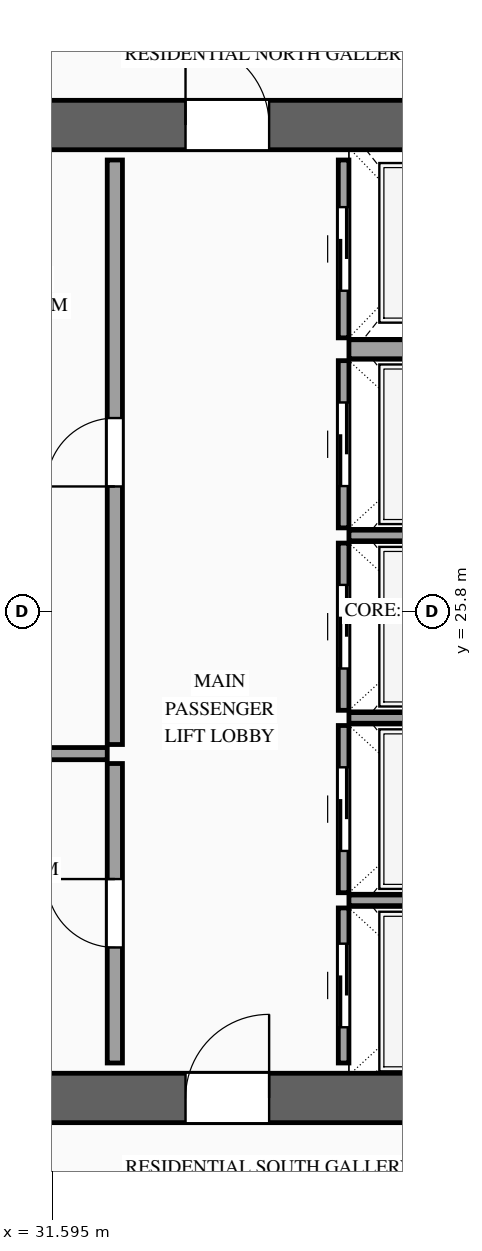
"""IFC4 building model, lengths in metres.
Left out: names, types, materials, properties, quantities, classifications, styles, units other than length and angle.
Written with IfcOpenShell. Run it as: python <this file> out.ifc"""

import sys

from ifc_helpers import new_model, si_unit, direction, frame, frame_2d, origin, place, context, subcontext, project, spatial, rectangle, extrude, source, transform, mapped, element, fill, save


model = new_model("IFC4")
c1 = context("Model", 3, precision=1e-05, world=origin(), true_north=direction((0.0, 1.0)))
c2 = subcontext(c1, "Body", "Model", "MODEL_VIEW")
j1 = project(units=[si_unit("LENGTHUNIT", "METRE"), si_unit("PLANEANGLEUNIT", "RADIAN")], contexts=[c1])
p1 = place(None, origin())
s1 = spatial("IfcSite", under=j1, at=p1, CompositionType="ELEMENT")
p2 = place(p1, origin())
s2 = spatial("IfcBuilding", under=s1, at=p2, CompositionType="ELEMENT")
p3 = place(p2, frame((0.0, 0.0, 216.0)))
s3 = spatial("IfcBuildingStorey", under=s2, at=p3, CompositionType="ELEMENT", Elevation=216.0)
p4 = place(p3, frame((23.475, 19.4, 0.0), z_axis=(0.0, 0.0, 1.0), x_axis=(1.0, 0.0, 0.0)))
e1 = element("IfcWall", 1, at=p4, inside=s3, PredefinedType="SHEAR", context=c2, shape_type="SweptSolid", body=[
    extrude(rectangle(XDim=27.05, YDim=0.65, at=frame_2d((13.525, 0.0))), origin(), (0.0, 0.0, 1.0), 3.5),
])
p5 = place(p4, frame((1.975, 0.0, 0.0)))
e2 = element("IfcOpeningElement", 2, at=p5, cuts=e1, PredefinedType="OPENING", context=c2, shape_type="SweptSolid", body=[
    extrude(rectangle(XDim=1.1, YDim=2.2, at=frame_2d((0.55, 1.1))), frame((0.0, 0.34, 0.0), z_axis=(0.0, -1.0, 0.0), x_axis=(1.0, 0.0, 0.0)), (0.0, 0.0, 1.0), 0.68),
])
p6 = place(p4, frame((9.875, 0.0, 0.0)))
e3 = element("IfcOpeningElement", 3, at=p6, cuts=e1, PredefinedType="OPENING", context=c2, shape_type="SweptSolid", body=[
    extrude(rectangle(XDim=1.1, YDim=2.2, at=frame_2d((0.55, 1.1))), frame((0.0, 0.34, 0.0), z_axis=(0.0, -1.0, 0.0), x_axis=(1.0, 0.0, 0.0)), (0.0, 0.0, 1.0), 0.68),
])
p7 = place(p4, frame((23.075, 0.0, 0.0)))
e4 = element("IfcOpeningElement", 4, at=p7, cuts=e1, PredefinedType="OPENING", context=c2, shape_type="SweptSolid", body=[
    extrude(rectangle(XDim=1.1, YDim=2.2, at=frame_2d((0.55, 1.1))), frame((0.0, 0.34, 0.0), z_axis=(0.0, -1.0, 0.0), x_axis=(1.0, 0.0, 0.0)), (0.0, 0.0, 1.0), 0.68),
])
p8 = place(p4, frame((19.695, 0.0, 0.0)))
e5 = element("IfcOpeningElement", 5, at=p8, cuts=e1, PredefinedType="OPENING", context=c2, shape_type="SweptSolid", body=[
    extrude(rectangle(XDim=0.9, YDim=2.15, at=frame_2d((0.45, 1.075))), frame((0.0, 0.34, 0.0), z_axis=(0.0, -1.0, 0.0), x_axis=(1.0, 0.0, 0.0)), (0.0, 0.0, 1.0), 0.68),
])
p9 = place(p4, frame((18.255, 0.0, 0.0)))
e6 = element("IfcOpeningElement", 6, at=p9, cuts=e1, PredefinedType="OPENING", context=c2, shape_type="SweptSolid", body=[
    extrude(rectangle(XDim=0.9, YDim=2.15, at=frame_2d((0.45, 1.075))), frame((0.0, 0.34, 0.0), z_axis=(0.0, -1.0, 0.0), x_axis=(1.0, 0.0, 0.0)), (0.0, 0.0, 1.0), 0.68),
])
p10 = place(p3, frame((23.475, 32.2, 0.0), z_axis=(0.0, 0.0, 1.0), x_axis=(1.0, 0.0, 0.0)))
e7 = element("IfcWall", 7, at=p10, inside=s3, PredefinedType="SHEAR", context=c2, shape_type="SweptSolid", body=[
    extrude(rectangle(XDim=27.05, YDim=0.65, at=frame_2d((13.525, 0.0))), origin(), (0.0, 0.0, 1.0), 3.5),
])
p11 = place(p10, frame((4.595, 0.0, 0.0)))
e8 = element("IfcOpeningElement", 8, at=p11, cuts=e7, PredefinedType="OPENING", context=c2, shape_type="SweptSolid", body=[
    extrude(rectangle(XDim=0.9, YDim=2.15, at=frame_2d((0.45, 1.075))), frame((0.0, 0.34, 0.0), z_axis=(0.0, -1.0, 0.0), x_axis=(1.0, 0.0, 0.0)), (0.0, 0.0, 1.0), 0.68),
])
p12 = place(p10, frame((9.875, 0.0, 0.0)))
e9 = element("IfcOpeningElement", 9, at=p12, cuts=e7, PredefinedType="OPENING", context=c2, shape_type="SweptSolid", body=[
    extrude(rectangle(XDim=1.1, YDim=2.2, at=frame_2d((0.55, 1.1))), frame((0.0, 0.34, 0.0), z_axis=(0.0, -1.0, 0.0), x_axis=(1.0, 0.0, 0.0)), (0.0, 0.0, 1.0), 0.68),
])
p13 = place(p10, frame((15.725, 0.0, 0.0)))
e10 = element("IfcOpeningElement", 10, at=p13, cuts=e7, PredefinedType="OPENING", context=c2, shape_type="SweptSolid", body=[
    extrude(rectangle(XDim=1.1, YDim=2.2, at=frame_2d((0.55, 1.1))), frame((0.0, 0.34, 0.0), z_axis=(0.0, -1.0, 0.0), x_axis=(1.0, 0.0, 0.0)), (0.0, 0.0, 1.0), 0.68),
])
p14 = place(p10, frame((18.925, 0.0, 0.0)))
e11 = element("IfcOpeningElement", 11, at=p14, cuts=e7, PredefinedType="OPENING", context=c2, shape_type="SweptSolid", body=[
    extrude(rectangle(XDim=0.9, YDim=2.15, at=frame_2d((0.45, 1.075))), frame((0.0, 0.34, 0.0), z_axis=(0.0, -1.0, 0.0), x_axis=(1.0, 0.0, 0.0)), (0.0, 0.0, 1.0), 0.68),
])
p15 = place(p3, frame((35.43, 19.86, 0.0), z_axis=(0.0, 0.0, 1.0), x_axis=(0.0, 1.0, 0.0)))
e12 = element("IfcWall", 12, at=p15, inside=s3, PredefinedType="SOLIDWALL", context=c2, shape_type="SweptSolid", body=[
    extrude(rectangle(XDim=2.04, YDim=0.14, at=frame_2d((1.02, 0.0))), origin(), (0.0, 0.0, 1.0), 3.22),
])
p16 = place(p15, frame((0.47, 0.0, 0.0)))
e13 = element("IfcOpeningElement", 13, at=p16, cuts=e12, PredefinedType="OPENING", context=c2, shape_type="SweptSolid", body=[
    extrude(rectangle(XDim=1.1, YDim=2.2, at=frame_2d((0.55, 1.1))), frame((0.0, 0.085, 0.0), z_axis=(0.0, -1.0, 0.0), x_axis=(1.0, 0.0, 0.0)), (0.0, 0.0, 1.0), 0.17),
])
m1 = source(origin(), c2, "Body", "SweptSolid", [
    extrude(rectangle(XDim=2.4, YDim=0.14, at=frame_2d((1.2, 0.0))), origin(), (0.0, 0.0, 1.0), 3.22),
])
p17 = place(p3, frame((35.5, 22.0, 0.0), z_axis=(0.0, 0.0, 1.0), x_axis=(1.0, 0.0, 0.0)))
e14 = element("IfcWall", 14, at=p17, inside=s3, PredefinedType="SOLIDWALL", context=c2, shape_type="MappedRepresentation", body=[
    mapped(m1, transform((0.0, 0.0, 0.0), scale=1.0)),
])
p18 = place(p3, frame((35.43, 22.1, 0.0), z_axis=(0.0, 0.0, 1.0), x_axis=(0.0, 1.0, 0.0)))
e15 = element("IfcWall", 15, at=p18, inside=s3, PredefinedType="SOLIDWALL", context=c2, shape_type="SweptSolid", body=[
    extrude(rectangle(XDim=2.2, YDim=0.14, at=frame_2d((1.1, 0.0))), origin(), (0.0, 0.0, 1.0), 3.22),
])
p19 = place(p18, frame((0.55, 0.0, 0.0)))
e16 = element("IfcOpeningElement", 16, at=p19, cuts=e15, PredefinedType="OPENING", context=c2, shape_type="SweptSolid", body=[
    extrude(rectangle(XDim=1.1, YDim=2.2, at=frame_2d((0.55, 1.1))), frame((0.0, 0.085, 0.0), z_axis=(0.0, -1.0, 0.0), x_axis=(1.0, 0.0, 0.0)), (0.0, 0.0, 1.0), 0.17),
])
p20 = place(p3, frame((35.5, 24.4, 0.0), z_axis=(0.0, 0.0, 1.0), x_axis=(1.0, 0.0, 0.0)))
e17 = element("IfcWall", 17, at=p20, inside=s3, PredefinedType="SOLIDWALL", context=c2, shape_type="MappedRepresentation", body=[
    mapped(m1, transform((0.0, 0.0, 0.0), scale=1.0)),
])
p21 = place(p3, frame((35.43, 24.5, 0.0), z_axis=(0.0, 0.0, 1.0), x_axis=(0.0, 1.0, 0.0)))
e18 = element("IfcWall", 18, at=p21, inside=s3, PredefinedType="SOLIDWALL", context=c2, shape_type="SweptSolid", body=[
    extrude(rectangle(XDim=2.2, YDim=0.14, at=frame_2d((1.1, 0.0))), origin(), (0.0, 0.0, 1.0), 3.22),
])
p22 = place(p21, frame((0.55, 0.0, 0.0)))
e19 = element("IfcOpeningElement", 19, at=p22, cuts=e18, PredefinedType="OPENING", context=c2, shape_type="SweptSolid", body=[
    extrude(rectangle(XDim=1.1, YDim=2.2, at=frame_2d((0.55, 1.1))), frame((0.0, 0.085, 0.0), z_axis=(0.0, -1.0, 0.0), x_axis=(1.0, 0.0, 0.0)), (0.0, 0.0, 1.0), 0.17),
])
p23 = place(p3, frame((35.5, 26.8, 0.0), z_axis=(0.0, 0.0, 1.0), x_axis=(1.0, 0.0, 0.0)))
e20 = element("IfcWall", 20, at=p23, inside=s3, PredefinedType="SOLIDWALL", context=c2, shape_type="MappedRepresentation", body=[
    mapped(m1, transform((0.0, 0.0, 0.0), scale=1.0)),
])
p24 = place(p3, frame((35.43, 26.9, 0.0), z_axis=(0.0, 0.0, 1.0), x_axis=(0.0, 1.0, 0.0)))
e21 = element("IfcWall", 21, at=p24, inside=s3, PredefinedType="SOLIDWALL", context=c2, shape_type="SweptSolid", body=[
    extrude(rectangle(XDim=2.2, YDim=0.14, at=frame_2d((1.1, 0.0))), origin(), (0.0, 0.0, 1.0), 3.22),
])
p25 = place(p24, frame((0.55, 0.0, 0.0)))
e22 = element("IfcOpeningElement", 22, at=p25, cuts=e21, PredefinedType="OPENING", context=c2, shape_type="SweptSolid", body=[
    extrude(rectangle(XDim=1.1, YDim=2.2, at=frame_2d((0.55, 1.1))), frame((0.0, 0.085, 0.0), z_axis=(0.0, -1.0, 0.0), x_axis=(1.0, 0.0, 0.0)), (0.0, 0.0, 1.0), 0.17),
])
p26 = place(p3, frame((35.43, 29.4, 0.0), z_axis=(0.0, 0.0, 1.0), x_axis=(0.0, 1.0, 0.0)))
e23 = element("IfcWall", 23, at=p26, inside=s3, PredefinedType="SOLIDWALL", context=c2, shape_type="SweptSolid", body=[
    extrude(rectangle(XDim=2.34, YDim=0.14, at=frame_2d((1.17, 0.0))), origin(), (0.0, 0.0, 1.0), 3.22),
])
p27 = place(p26, frame((0.62, 0.0, 0.0)))
e24 = element("IfcOpeningElement", 24, at=p27, cuts=e23, PredefinedType="OPENING", context=c2, shape_type="SweptSolid", body=[
    extrude(rectangle(XDim=1.1, YDim=2.2, at=frame_2d((0.55, 1.1))), frame((0.0, 0.085, 0.0), z_axis=(0.0, -1.0, 0.0), x_axis=(1.0, 0.0, 0.0)), (0.0, 0.0, 1.0), 0.17),
])
m2 = source(origin(), c2, "Body", "SweptSolid", [
    extrude(rectangle(XDim=2.4, YDim=0.25, at=frame_2d((1.2, 0.0))), origin(), (0.0, 0.0, 1.0), 3.22),
])
p28 = place(p3, frame((35.5, 29.25, 0.0), z_axis=(0.0, 0.0, 1.0), x_axis=(1.0, 0.0, 0.0)))
e25 = element("IfcWall", 25, at=p28, inside=s3, PredefinedType="SOLIDWALL", context=c2, shape_type="MappedRepresentation", body=[
    mapped(m2, transform((0.0, 0.0, 0.0), scale=1.0)),
])
p29 = place(p3, frame((32.42, 19.86, 0.0), z_axis=(0.0, 0.0, 1.0), x_axis=(0.0, 1.0, 0.0)))
e26 = element("IfcWall", 26, at=p29, inside=s3, PredefinedType="PARTITIONING", context=c2, shape_type="SweptSolid", body=[
    extrude(rectangle(XDim=3.94, YDim=0.2, at=frame_2d((1.97, 0.0))), origin(), (0.0, 0.0, 1.0), 3.22),
])
p30 = place(p29, frame((1.52, 0.0, 0.0)))
e27 = element("IfcOpeningElement", 27, at=p30, cuts=e26, PredefinedType="OPENING", context=c2, shape_type="SweptSolid", body=[
    extrude(rectangle(XDim=0.9, YDim=2.15, at=frame_2d((0.45, 1.075))), frame((0.0, 0.115, 0.0), z_axis=(0.0, -1.0, 0.0), x_axis=(1.0, 0.0, 0.0)), (0.0, 0.0, 1.0), 0.23),
])
p31 = place(p3, frame((32.42, 24.05, 0.0), z_axis=(0.0, 0.0, 1.0), x_axis=(0.0, 1.0, 0.0)))
e28 = element("IfcWall", 28, at=p31, inside=s3, PredefinedType="PARTITIONING", context=c2, shape_type="SweptSolid", body=[
    extrude(rectangle(XDim=7.69, YDim=0.2, at=frame_2d((3.845, 0.0))), origin(), (0.0, 0.0, 1.0), 3.22),
])
p32 = place(p31, frame((3.395, 0.0, 0.0)))
e29 = element("IfcOpeningElement", 29, at=p32, cuts=e28, PredefinedType="OPENING", context=c2, shape_type="SweptSolid", body=[
    extrude(rectangle(XDim=0.9, YDim=2.15, at=frame_2d((0.45, 1.075))), frame((0.0, 0.115, 0.0), z_axis=(0.0, -1.0, 0.0), x_axis=(1.0, 0.0, 0.0)), (0.0, 0.0, 1.0), 0.23),
])
m3 = source(origin(), c2, "Body", "SweptSolid", [
    extrude(rectangle(XDim=2.47, YDim=0.16, at=frame_2d((1.235, 0.0))), origin(), (0.0, 0.0, 1.0), 3.22),
])
p33 = place(p3, frame((29.85, 23.93, 0.0), z_axis=(0.0, 0.0, 1.0), x_axis=(1.0, 0.0, 0.0)))
e30 = element("IfcWall", 30, at=p33, inside=s3, PredefinedType="PARTITIONING", context=c2, shape_type="MappedRepresentation", body=[
    mapped(m3, transform((0.0, 0.0, 0.0), scale=1.0)),
])
m4 = source(origin(), c2, "Body", "SweptSolid", [
    extrude(rectangle(XDim=1.1, YDim=2.2, at=frame_2d((0.55, 1.1))), frame((0.0, 0.025, 0.0), z_axis=(0.0, -1.0, 0.0), x_axis=(1.0, 0.0, 0.0)), (0.0, 0.0, 1.0), 0.05),
])
p34 = place(p16, origin())
e31 = element("IfcDoor", 31, at=p34, inside=s3, OperationType="SLIDING_TO_RIGHT", PredefinedType="DOOR", context=c2, shape_type="MappedRepresentation", body=[
    mapped(m4, transform((0.0, 0.0, 0.0), scale=1.0)),
])
fill(e13, e31)
p35 = place(p19, origin())
e32 = element("IfcDoor", 32, at=p35, inside=s3, OperationType="SLIDING_TO_LEFT", PredefinedType="DOOR", context=c2, shape_type="MappedRepresentation", body=[
    mapped(m4, transform((0.0, 0.0, 0.0), scale=1.0)),
])
fill(e16, e32)
p36 = place(p22, origin())
e33 = element("IfcDoor", 33, at=p36, inside=s3, OperationType="SLIDING_TO_RIGHT", PredefinedType="DOOR", context=c2, shape_type="MappedRepresentation", body=[
    mapped(m4, transform((0.0, 0.0, 0.0), scale=1.0)),
])
fill(e19, e33)
p37 = place(p25, origin())
e34 = element("IfcDoor", 34, at=p37, inside=s3, OperationType="SLIDING_TO_LEFT", PredefinedType="DOOR", context=c2, shape_type="MappedRepresentation", body=[
    mapped(m4, transform((0.0, 0.0, 0.0), scale=1.0)),
])
fill(e22, e34)
p38 = place(p27, origin())
e35 = element("IfcDoor", 35, at=p38, inside=s3, OperationType="SLIDING_TO_RIGHT", PredefinedType="DOOR", context=c2, shape_type="MappedRepresentation", body=[
    mapped(m4, transform((0.0, 0.0, 0.0), scale=1.0)),
])
fill(e24, e35)
m5 = source(origin(), c2, "Body", "SweptSolid", [
    extrude(rectangle(XDim=1.1, YDim=2.2, at=frame_2d((0.55, 1.1))), frame((0.0, 0.025, 0.0), z_axis=(0.0, -1.0, 0.0), x_axis=(1.0, 0.0, 0.0)), (0.0, 0.0, 1.0), 0.05),
])
p39 = place(p6, origin())
e36 = element("IfcDoor", 36, at=p39, inside=s3, OperationType="SINGLE_SWING_RIGHT", PredefinedType="DOOR", context=c2, shape_type="MappedRepresentation", body=[
    mapped(m5, transform((0.0, 0.0, 0.0), scale=1.0)),
])
fill(e3, e36)
p40 = place(p12, origin())
e37 = element("IfcDoor", 37, at=p40, inside=s3, OperationType="SINGLE_SWING_LEFT", PredefinedType="DOOR", context=c2, shape_type="MappedRepresentation", body=[
    mapped(m5, transform((0.0, 0.0, 0.0), scale=1.0)),
])
fill(e9, e37)
m6 = source(origin(), c2, "Body", "SweptSolid", [
    extrude(rectangle(XDim=0.9, YDim=2.15, at=frame_2d((0.45, 1.075))), frame((0.0, 0.025, 0.0), z_axis=(0.0, -1.0, 0.0), x_axis=(1.0, 0.0, 0.0)), (0.0, 0.0, 1.0), 0.05),
])
p41 = place(p30, origin())
e38 = element("IfcDoor", 38, at=p41, inside=s3, OperationType="SINGLE_SWING_RIGHT", PredefinedType="DOOR", context=c2, shape_type="MappedRepresentation", body=[
    mapped(m6, transform((0.0, 0.0, 0.0), scale=1.0)),
])
fill(e27, e38)
p42 = place(p32, origin())
e39 = element("IfcDoor", 39, at=p42, inside=s3, OperationType="SINGLE_SWING_LEFT", PredefinedType="DOOR", context=c2, shape_type="MappedRepresentation", body=[
    mapped(m6, transform((0.0, 0.0, 0.0), scale=1.0)),
])
fill(e29, e39)
save(model, sys.argv[1])
